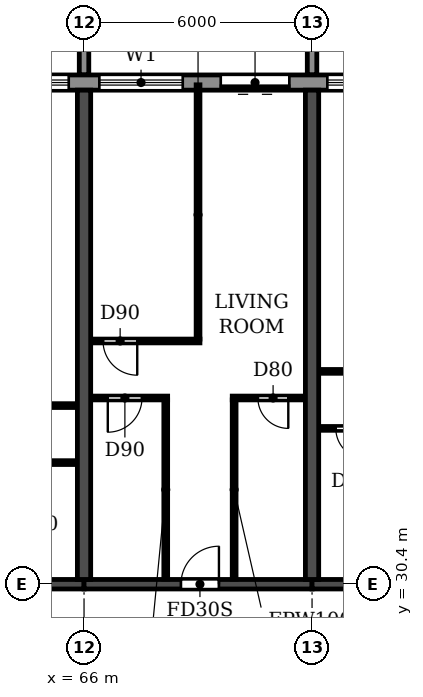
"""IFC4 building model, lengths in metres.
Left out: names, types, materials, properties, quantities, classifications, styles, units other than length and angle.
Written with IfcOpenShell. Run it as: python <this file> out.ifc"""

import sys

from ifc_helpers import new_model, si_unit, direction, frame, frame_2d, origin, place, context, subcontext, project, spatial, polyline, rectangle, outline, extrude, source, transform, mapped, element, fill, save


model = new_model("IFC4")
c1 = context("Model", 3, precision=1e-05, world=origin(), true_north=direction((0.0, 1.0)))
c2 = subcontext(c1, "Body", "Model", "MODEL_VIEW")
j1 = project(units=[si_unit("LENGTHUNIT", "METRE"), si_unit("PLANEANGLEUNIT", "RADIAN")], contexts=[c1])
p1 = place(None, origin())
s1 = spatial("IfcSite", under=j1, at=p1, CompositionType="ELEMENT")
p2 = place(p1, origin())
s2 = spatial("IfcBuilding", under=s1, at=p2, CompositionType="ELEMENT")
p3 = place(p2, frame((0.0, 0.0, 92.7)))
s3 = spatial("IfcBuildingStorey", under=s2, at=p3, CompositionType="ELEMENT", Elevation=92.7)
for number, where, z_axis, x_axis in (
    (1, (66.0, 30.525, 0.0), (0.0, 0.0, 1.0), (0.0, 1.0, 0.0)),
    (2, (72.0, 30.525, 0.0), (0.0, 0.0, 1.0), (0.0, 1.0, 0.0)),
):
    element("IfcWall", number, at=place(p3, frame(where, z_axis=z_axis, x_axis=x_axis)), inside=s3, PredefinedType="SHEAR", context=c2, shape_type="SweptSolid", body=[
        extrude(rectangle(XDim=12.875, YDim=0.35, at=frame_2d((6.438, 0.0))), origin(), (0.0, 0.0, 1.0), 3.06),
    ])
p4 = place(p3, frame((60.0, 30.4, 0.0), z_axis=(0.0, 0.0, 1.0), x_axis=(1.0, 0.0, 0.0)))
e3 = element("IfcWall", 3, at=p4, inside=s3, PredefinedType="SHEAR", context=c2, shape_type="SweptSolid", body=[
    extrude(rectangle(XDim=6.0, YDim=0.25, at=frame_2d((3.0, 0.0))), origin(), (0.0, 0.0, 1.0), 2.46),
])
p5 = place(p3, frame((66.0, 30.4, 0.0), z_axis=(0.0, 0.0, 1.0), x_axis=(1.0, 0.0, 0.0)))
e4 = element("IfcWall", 4, at=p5, inside=s3, PredefinedType="SHEAR", context=c2, shape_type="SweptSolid", body=[
    extrude(rectangle(XDim=6.0, YDim=0.25, at=frame_2d((3.0, 0.0))), origin(), (0.0, 0.0, 1.0), 2.46),
])
p6 = place(p5, frame((2.55, 0.0, 0.0)))
e5 = element("IfcOpeningElement", 5, at=p6, cuts=e4, PredefinedType="OPENING", context=c2, shape_type="SweptSolid", body=[
    extrude(rectangle(XDim=1.0, YDim=2.1, at=frame_2d((0.5, 1.05))), frame((0.0, 0.135, 0.0), z_axis=(0.0, -1.0, 0.0), x_axis=(1.0, 0.0, 0.0)), (0.0, 0.0, 1.0), 0.27),
])
p7 = place(p3, frame((72.0, 30.4, 0.0), z_axis=(0.0, 0.0, 1.0), x_axis=(1.0, 0.0, 0.0)))
e6 = element("IfcWall", 6, at=p7, inside=s3, PredefinedType="SHEAR", context=c2, shape_type="SweptSolid", body=[
    extrude(rectangle(XDim=6.0, YDim=0.25, at=frame_2d((3.0, 0.0))), origin(), (0.0, 0.0, 1.0), 2.46),
])
p8 = place(p7, frame((2.45, 0.0, 0.0)))
e7 = element("IfcOpeningElement", 7, at=p8, cuts=e6, PredefinedType="OPENING", context=c2, shape_type="SweptSolid", body=[
    extrude(rectangle(XDim=1.0, YDim=2.1, at=frame_2d((0.5, 1.05))), frame((0.0, 0.135, 0.0), z_axis=(0.0, -1.0, 0.0), x_axis=(1.0, 0.0, 0.0)), (0.0, 0.0, 1.0), 0.27),
])
p9 = place(p3, frame((91.317, 43.6, 0.0), z_axis=(0.0, 0.0, 1.0), x_axis=(-1.0, 0.0, 0.0)))
e8 = element("IfcWall", 8, at=p9, inside=s3, PredefinedType="STANDARD", context=c2, shape_type="SweptSolid", body=[
    extrude(rectangle(XDim=80.634, YDim=0.4, at=frame_2d((40.317, 0.0))), origin(), (0.0, 0.0, 1.0), 3.06),
])
p10 = place(p9, frame((76.717, 0.0, 0.9)))
e9 = element("IfcOpeningElement", 9, at=p10, cuts=e8, PredefinedType="OPENING", context=c2, shape_type="SweptSolid", body=[
    extrude(rectangle(XDim=2.2, YDim=1.5, at=frame_2d((1.1, 0.75))), frame((0.0, 0.21, 0.0), z_axis=(0.0, -1.0, 0.0), x_axis=(1.0, 0.0, 0.0)), (0.0, 0.0, 1.0), 0.42),
])
p11 = place(p9, frame((73.917, 0.0, 0.0)))
e10 = element("IfcOpeningElement", 10, at=p11, cuts=e8, PredefinedType="OPENING", context=c2, shape_type="SweptSolid", body=[
    extrude(rectangle(XDim=1.8, YDim=2.4, at=frame_2d((0.9, 1.2))), frame((0.0, 0.21, 0.0), z_axis=(0.0, -1.0, 0.0), x_axis=(1.0, 0.0, 0.0)), (0.0, 0.0, 1.0), 0.42),
])
p12 = place(p9, frame((70.717, 0.0, 0.9)))
e11 = element("IfcOpeningElement", 11, at=p12, cuts=e8, PredefinedType="OPENING", context=c2, shape_type="SweptSolid", body=[
    extrude(rectangle(XDim=2.2, YDim=1.5, at=frame_2d((1.1, 0.75))), frame((0.0, 0.21, 0.0), z_axis=(0.0, -1.0, 0.0), x_axis=(1.0, 0.0, 0.0)), (0.0, 0.0, 1.0), 0.42),
])
p13 = place(p9, frame((67.717, 0.0, 0.9)))
e12 = element("IfcOpeningElement", 12, at=p13, cuts=e8, PredefinedType="OPENING", context=c2, shape_type="SweptSolid", body=[
    extrude(rectangle(XDim=2.2, YDim=1.5, at=frame_2d((1.1, 0.75))), frame((0.0, 0.21, 0.0), z_axis=(0.0, -1.0, 0.0), x_axis=(1.0, 0.0, 0.0)), (0.0, 0.0, 1.0), 0.42),
])
p14 = place(p9, frame((64.717, 0.0, 0.9)))
e13 = element("IfcOpeningElement", 13, at=p14, cuts=e8, PredefinedType="OPENING", context=c2, shape_type="SweptSolid", body=[
    extrude(rectangle(XDim=2.2, YDim=1.5, at=frame_2d((1.1, 0.75))), frame((0.0, 0.21, 0.0), z_axis=(0.0, -1.0, 0.0), x_axis=(1.0, 0.0, 0.0)), (0.0, 0.0, 1.0), 0.42),
])
p15 = place(p9, frame((61.917, 0.0, 0.0)))
e14 = element("IfcOpeningElement", 14, at=p15, cuts=e8, PredefinedType="OPENING", context=c2, shape_type="SweptSolid", body=[
    extrude(rectangle(XDim=1.8, YDim=2.4, at=frame_2d((0.9, 1.2))), frame((0.0, 0.21, 0.0), z_axis=(0.0, -1.0, 0.0), x_axis=(1.0, 0.0, 0.0)), (0.0, 0.0, 1.0), 0.42),
])
p16 = place(p9, frame((58.717, 0.0, 0.9)))
e15 = element("IfcOpeningElement", 15, at=p16, cuts=e8, PredefinedType="OPENING", context=c2, shape_type="SweptSolid", body=[
    extrude(rectangle(XDim=2.2, YDim=1.5, at=frame_2d((1.1, 0.75))), frame((0.0, 0.21, 0.0), z_axis=(0.0, -1.0, 0.0), x_axis=(1.0, 0.0, 0.0)), (0.0, 0.0, 1.0), 0.42),
])
p17 = place(p9, frame((55.717, 0.0, 0.9)))
e16 = element("IfcOpeningElement", 16, at=p17, cuts=e8, PredefinedType="OPENING", context=c2, shape_type="SweptSolid", body=[
    extrude(rectangle(XDim=2.2, YDim=1.5, at=frame_2d((1.1, 0.75))), frame((0.0, 0.21, 0.0), z_axis=(0.0, -1.0, 0.0), x_axis=(1.0, 0.0, 0.0)), (0.0, 0.0, 1.0), 0.42),
])
p18 = place(p9, frame((52.917, 0.0, 0.0)))
e17 = element("IfcOpeningElement", 17, at=p18, cuts=e8, PredefinedType="OPENING", context=c2, shape_type="SweptSolid", body=[
    extrude(rectangle(XDim=1.8, YDim=2.4, at=frame_2d((0.9, 1.2))), frame((0.0, 0.21, 0.0), z_axis=(0.0, -1.0, 0.0), x_axis=(1.0, 0.0, 0.0)), (0.0, 0.0, 1.0), 0.42),
])
p19 = place(p9, frame((49.717, 0.0, 0.9)))
e18 = element("IfcOpeningElement", 18, at=p19, cuts=e8, PredefinedType="OPENING", context=c2, shape_type="SweptSolid", body=[
    extrude(rectangle(XDim=2.2, YDim=1.5, at=frame_2d((1.1, 0.75))), frame((0.0, 0.21, 0.0), z_axis=(0.0, -1.0, 0.0), x_axis=(1.0, 0.0, 0.0)), (0.0, 0.0, 1.0), 0.42),
])
p20 = place(p9, frame((46.717, 0.0, 0.9)))
e19 = element("IfcOpeningElement", 19, at=p20, cuts=e8, PredefinedType="OPENING", context=c2, shape_type="SweptSolid", body=[
    extrude(rectangle(XDim=2.2, YDim=1.5, at=frame_2d((1.1, 0.75))), frame((0.0, 0.21, 0.0), z_axis=(0.0, -1.0, 0.0), x_axis=(1.0, 0.0, 0.0)), (0.0, 0.0, 1.0), 0.42),
])
p21 = place(p9, frame((43.717, 0.0, 0.9)))
e20 = element("IfcOpeningElement", 20, at=p21, cuts=e8, PredefinedType="OPENING", context=c2, shape_type="SweptSolid", body=[
    extrude(rectangle(XDim=2.2, YDim=1.5, at=frame_2d((1.1, 0.75))), frame((0.0, 0.21, 0.0), z_axis=(0.0, -1.0, 0.0), x_axis=(1.0, 0.0, 0.0)), (0.0, 0.0, 1.0), 0.42),
])
p22 = place(p9, frame((40.717, 0.0, 0.9)))
e21 = element("IfcOpeningElement", 21, at=p22, cuts=e8, PredefinedType="OPENING", context=c2, shape_type="SweptSolid", body=[
    extrude(rectangle(XDim=2.2, YDim=1.5, at=frame_2d((1.1, 0.75))), frame((0.0, 0.21, 0.0), z_axis=(0.0, -1.0, 0.0), x_axis=(1.0, 0.0, 0.0)), (0.0, 0.0, 1.0), 0.42),
])
p23 = place(p9, frame((37.917, 0.0, 0.0)))
e22 = element("IfcOpeningElement", 22, at=p23, cuts=e8, PredefinedType="OPENING", context=c2, shape_type="SweptSolid", body=[
    extrude(rectangle(XDim=1.8, YDim=2.4, at=frame_2d((0.9, 1.2))), frame((0.0, 0.21, 0.0), z_axis=(0.0, -1.0, 0.0), x_axis=(1.0, 0.0, 0.0)), (0.0, 0.0, 1.0), 0.42),
])
p24 = place(p9, frame((34.917, 0.0, 0.0)))
e23 = element("IfcOpeningElement", 23, at=p24, cuts=e8, PredefinedType="OPENING", context=c2, shape_type="SweptSolid", body=[
    extrude(rectangle(XDim=1.8, YDim=2.4, at=frame_2d((0.9, 1.2))), frame((0.0, 0.21, 0.0), z_axis=(0.0, -1.0, 0.0), x_axis=(1.0, 0.0, 0.0)), (0.0, 0.0, 1.0), 0.42),
])
p25 = place(p9, frame((31.717, 0.0, 0.9)))
e24 = element("IfcOpeningElement", 24, at=p25, cuts=e8, PredefinedType="OPENING", context=c2, shape_type="SweptSolid", body=[
    extrude(rectangle(XDim=2.2, YDim=1.5, at=frame_2d((1.1, 0.75))), frame((0.0, 0.21, 0.0), z_axis=(0.0, -1.0, 0.0), x_axis=(1.0, 0.0, 0.0)), (0.0, 0.0, 1.0), 0.42),
])
p26 = place(p9, frame((28.717, 0.0, 0.9)))
e25 = element("IfcOpeningElement", 25, at=p26, cuts=e8, PredefinedType="OPENING", context=c2, shape_type="SweptSolid", body=[
    extrude(rectangle(XDim=2.2, YDim=1.5, at=frame_2d((1.1, 0.75))), frame((0.0, 0.21, 0.0), z_axis=(0.0, -1.0, 0.0), x_axis=(1.0, 0.0, 0.0)), (0.0, 0.0, 1.0), 0.42),
])
p27 = place(p9, frame((25.717, 0.0, 0.9)))
e26 = element("IfcOpeningElement", 26, at=p27, cuts=e8, PredefinedType="OPENING", context=c2, shape_type="SweptSolid", body=[
    extrude(rectangle(XDim=2.2, YDim=1.5, at=frame_2d((1.1, 0.75))), frame((0.0, 0.21, 0.0), z_axis=(0.0, -1.0, 0.0), x_axis=(1.0, 0.0, 0.0)), (0.0, 0.0, 1.0), 0.42),
])
p28 = place(p9, frame((22.717, 0.0, 0.9)))
e27 = element("IfcOpeningElement", 27, at=p28, cuts=e8, PredefinedType="OPENING", context=c2, shape_type="SweptSolid", body=[
    extrude(rectangle(XDim=2.2, YDim=1.5, at=frame_2d((1.1, 0.75))), frame((0.0, 0.21, 0.0), z_axis=(0.0, -1.0, 0.0), x_axis=(1.0, 0.0, 0.0)), (0.0, 0.0, 1.0), 0.42),
])
p29 = place(p9, frame((19.917, 0.0, 0.0)))
e28 = element("IfcOpeningElement", 28, at=p29, cuts=e8, PredefinedType="OPENING", context=c2, shape_type="SweptSolid", body=[
    extrude(rectangle(XDim=1.8, YDim=2.4, at=frame_2d((0.9, 1.2))), frame((0.0, 0.21, 0.0), z_axis=(0.0, -1.0, 0.0), x_axis=(1.0, 0.0, 0.0)), (0.0, 0.0, 1.0), 0.42),
])
p30 = place(p9, frame((16.717, 0.0, 0.9)))
e29 = element("IfcOpeningElement", 29, at=p30, cuts=e8, PredefinedType="OPENING", context=c2, shape_type="SweptSolid", body=[
    extrude(rectangle(XDim=2.2, YDim=1.5, at=frame_2d((1.1, 0.75))), frame((0.0, 0.21, 0.0), z_axis=(0.0, -1.0, 0.0), x_axis=(1.0, 0.0, 0.0)), (0.0, 0.0, 1.0), 0.42),
])
p31 = place(p9, frame((13.917, 0.0, 0.0)))
e30 = element("IfcOpeningElement", 30, at=p31, cuts=e8, PredefinedType="OPENING", context=c2, shape_type="SweptSolid", body=[
    extrude(rectangle(XDim=1.8, YDim=2.4, at=frame_2d((0.9, 1.2))), frame((0.0, 0.21, 0.0), z_axis=(0.0, -1.0, 0.0), x_axis=(1.0, 0.0, 0.0)), (0.0, 0.0, 1.0), 0.42),
])
p32 = place(p9, frame((10.717, 0.0, 0.9)))
e31 = element("IfcOpeningElement", 31, at=p32, cuts=e8, PredefinedType="OPENING", context=c2, shape_type="SweptSolid", body=[
    extrude(rectangle(XDim=2.2, YDim=1.5, at=frame_2d((1.1, 0.75))), frame((0.0, 0.21, 0.0), z_axis=(0.0, -1.0, 0.0), x_axis=(1.0, 0.0, 0.0)), (0.0, 0.0, 1.0), 0.42),
])
p33 = place(p9, frame((7.917, 0.0, 0.0)))
e32 = element("IfcOpeningElement", 32, at=p33, cuts=e8, PredefinedType="OPENING", context=c2, shape_type="SweptSolid", body=[
    extrude(rectangle(XDim=1.8, YDim=2.4, at=frame_2d((0.9, 1.2))), frame((0.0, 0.21, 0.0), z_axis=(0.0, -1.0, 0.0), x_axis=(1.0, 0.0, 0.0)), (0.0, 0.0, 1.0), 0.42),
])
p34 = place(p9, frame((4.717, 0.0, 0.9)))
e33 = element("IfcOpeningElement", 33, at=p34, cuts=e8, PredefinedType="OPENING", context=c2, shape_type="SweptSolid", body=[
    extrude(rectangle(XDim=2.2, YDim=1.5, at=frame_2d((1.1, 0.75))), frame((0.0, 0.21, 0.0), z_axis=(0.0, -1.0, 0.0), x_axis=(1.0, 0.0, 0.0)), (0.0, 0.0, 1.0), 0.42),
])
p35 = place(p9, frame((1.917, 0.0, 0.0)))
e34 = element("IfcOpeningElement", 34, at=p35, cuts=e8, PredefinedType="OPENING", context=c2, shape_type="SweptSolid", body=[
    extrude(rectangle(XDim=1.8, YDim=2.4, at=frame_2d((0.9, 1.2))), frame((0.0, 0.21, 0.0), z_axis=(0.0, -1.0, 0.0), x_axis=(1.0, 0.0, 0.0)), (0.0, 0.0, 1.0), 0.42),
])
m1 = source(origin(), c2, "Body", "SweptSolid", [
    extrude(outline(polyline([(0.0, 0.0), (0.25, 0.0), (0.25, 3.1), (0.0, 3.1), (0.0, 0.0)])), origin(), (0.0, 0.0, 1.0), 3.1),
])
for number, where in (
    (35, (65.875, 43.8, 0.0)),
    (36, (71.875, 43.8, 0.0)),
):
    element("IfcWall", number, at=place(p3, frame(where)), inside=s3, PredefinedType="STANDARD", context=c2, shape_type="MappedRepresentation", body=[
        mapped(m1, transform((0.0, 0.0, 0.0))),
    ])
p36 = place(p3, frame((62.65, 33.6, 0.0), z_axis=(0.0, 0.0, 1.0), x_axis=(1.0, 0.0, 0.0)))
e37 = element("IfcWall", 37, at=p36, inside=s3, PredefinedType="PARTITIONING", context=c2, shape_type="SweptSolid", body=[
    extrude(rectangle(XDim=3.165, YDim=0.1, at=frame_2d((1.583, 0.0))), origin(), (0.0, 0.0, 1.0), 3.06),
])
p37 = place(p36, frame((1.3, 0.0, 0.0)))
e38 = element("IfcOpeningElement", 38, at=p37, cuts=e37, PredefinedType="OPENING", context=c2, shape_type="SweptSolid", body=[
    extrude(rectangle(XDim=0.8, YDim=2.1, at=frame_2d((0.4, 1.05))), frame((0.0, 0.06, 0.0), z_axis=(0.0, -1.0, 0.0), x_axis=(1.0, 0.0, 0.0)), (0.0, 0.0, 1.0), 0.12),
])
p38 = place(p3, frame((72.185, 34.5, 0.0), z_axis=(0.0, 0.0, 1.0), x_axis=(1.0, 0.0, 0.0)))
e39 = element("IfcWall", 39, at=p38, inside=s3, PredefinedType="PARTITIONING", context=c2, shape_type="SweptSolid", body=[
    extrude(rectangle(XDim=1.915, YDim=0.1, at=frame_2d((0.958, 0.0))), origin(), (0.0, 0.0, 1.0), 3.06),
])
p39 = place(p38, frame((0.44, 0.0, 0.0)))
e40 = element("IfcOpeningElement", 40, at=p39, cuts=e39, PredefinedType="OPENING", context=c2, shape_type="SweptSolid", body=[
    extrude(rectangle(XDim=0.8, YDim=2.1, at=frame_2d((0.4, 1.05))), frame((0.0, 0.06, 0.0), z_axis=(0.0, -1.0, 0.0), x_axis=(1.0, 0.0, 0.0)), (0.0, 0.0, 1.0), 0.12),
])
p40 = place(p3, frame((60.185, 35.1, 0.0), z_axis=(0.0, 0.0, 1.0), x_axis=(1.0, 0.0, 0.0)))
e41 = element("IfcWall", 41, at=p40, inside=s3, PredefinedType="PARTITIONING", context=c2, shape_type="SweptSolid", body=[
    extrude(rectangle(XDim=5.63, YDim=0.1, at=frame_2d((2.815, 0.0))), origin(), (0.0, 0.0, 1.0), 3.06),
])
p41 = place(p40, frame((1.415, 0.0, 0.0)))
e42 = element("IfcOpeningElement", 42, at=p41, cuts=e41, PredefinedType="OPENING", context=c2, shape_type="SweptSolid", body=[
    extrude(rectangle(XDim=0.9, YDim=2.1, at=frame_2d((0.45, 1.05))), frame((0.0, 0.06, 0.0), z_axis=(0.0, -1.0, 0.0), x_axis=(1.0, 0.0, 0.0)), (0.0, 0.0, 1.0), 0.12),
])
p42 = place(p40, frame((3.315, 0.0, 0.0)))
e43 = element("IfcOpeningElement", 43, at=p42, cuts=e41, PredefinedType="OPENING", context=c2, shape_type="SweptSolid", body=[
    extrude(rectangle(XDim=0.9, YDim=2.1, at=frame_2d((0.45, 1.05))), frame((0.0, 0.06, 0.0), z_axis=(0.0, -1.0, 0.0), x_axis=(1.0, 0.0, 0.0)), (0.0, 0.0, 1.0), 0.12),
])
p43 = place(p3, frame((66.185, 35.3, 0.0), z_axis=(0.0, 0.0, 1.0), x_axis=(1.0, 0.0, 0.0)))
e44 = element("IfcWall", 44, at=p43, inside=s3, PredefinedType="PARTITIONING", context=c2, shape_type="SweptSolid", body=[
    extrude(rectangle(XDim=2.015, YDim=0.1, at=frame_2d((1.007, 0.0))), origin(), (0.0, 0.0, 1.0), 3.06),
])
p44 = place(p43, frame((0.44, 0.0, 0.0)))
e45 = element("IfcOpeningElement", 45, at=p44, cuts=e44, PredefinedType="OPENING", context=c2, shape_type="SweptSolid", body=[
    extrude(rectangle(XDim=0.9, YDim=2.1, at=frame_2d((0.45, 1.05))), frame((0.0, 0.06, 0.0), z_axis=(0.0, -1.0, 0.0), x_axis=(1.0, 0.0, 0.0)), (0.0, 0.0, 1.0), 0.12),
])
p45 = place(p3, frame((69.9, 35.3, 0.0), z_axis=(0.0, 0.0, 1.0), x_axis=(1.0, 0.0, 0.0)))
e46 = element("IfcWall", 46, at=p45, inside=s3, PredefinedType="PARTITIONING", context=c2, shape_type="SweptSolid", body=[
    extrude(rectangle(XDim=1.915, YDim=0.1, at=frame_2d((0.958, 0.0))), origin(), (0.0, 0.0, 1.0), 3.06),
])
p46 = place(p45, frame((0.675, 0.0, 0.0)))
e47 = element("IfcOpeningElement", 47, at=p46, cuts=e46, PredefinedType="OPENING", context=c2, shape_type="SweptSolid", body=[
    extrude(rectangle(XDim=0.8, YDim=2.1, at=frame_2d((0.4, 1.05))), frame((0.0, 0.06, 0.0), z_axis=(0.0, -1.0, 0.0), x_axis=(1.0, 0.0, 0.0)), (0.0, 0.0, 1.0), 0.12),
])
p47 = place(p3, frame((72.185, 36.0, 0.0), z_axis=(0.0, 0.0, 1.0), x_axis=(1.0, 0.0, 0.0)))
e48 = element("IfcWall", 48, at=p47, inside=s3, PredefinedType="PARTITIONING", context=c2, shape_type="SweptSolid", body=[
    extrude(rectangle(XDim=2.865, YDim=0.1, at=frame_2d((1.433, 0.0))), origin(), (0.0, 0.0, 1.0), 3.06),
])
p48 = place(p47, frame((1.415, 0.0, 0.0)))
e49 = element("IfcOpeningElement", 49, at=p48, cuts=e48, PredefinedType="OPENING", context=c2, shape_type="SweptSolid", body=[
    extrude(rectangle(XDim=0.9, YDim=2.1, at=frame_2d((0.45, 1.05))), frame((0.0, 0.06, 0.0), z_axis=(0.0, -1.0, 0.0), x_axis=(1.0, 0.0, 0.0)), (0.0, 0.0, 1.0), 0.12),
])
p49 = place(p3, frame((66.185, 36.8, 0.0), z_axis=(0.0, 0.0, 1.0), x_axis=(1.0, 0.0, 0.0)))
e50 = element("IfcWall", 50, at=p49, inside=s3, PredefinedType="PARTITIONING", context=c2, shape_type="SweptSolid", body=[
    extrude(rectangle(XDim=2.865, YDim=0.1, at=frame_2d((1.433, 0.0))), origin(), (0.0, 0.0, 1.0), 3.06),
])
p50 = place(p49, frame((0.315, 0.0, 0.0)))
e51 = element("IfcOpeningElement", 51, at=p50, cuts=e50, PredefinedType="OPENING", context=c2, shape_type="SweptSolid", body=[
    extrude(rectangle(XDim=0.9, YDim=2.1, at=frame_2d((0.45, 1.05))), frame((0.0, 0.06, 0.0), z_axis=(0.0, -1.0, 0.0), x_axis=(1.0, 0.0, 0.0)), (0.0, 0.0, 1.0), 0.12),
])
p51 = place(p3, frame((68.15, 30.535, 0.0), z_axis=(0.0, 0.0, 1.0), x_axis=(0.0, 1.0, 0.0)))
e52 = element("IfcWall", 52, at=p51, inside=s3, PredefinedType="PARTITIONING", context=c2, shape_type="SweptSolid", body=[
    extrude(rectangle(XDim=4.715, YDim=0.1, at=frame_2d((2.357, 0.0))), origin(), (0.0, 0.0, 1.0), 3.06),
])
p52 = place(p3, frame((69.0, 36.85, 0.0), z_axis=(0.0, 0.0, 1.0), x_axis=(0.0, 1.0, 0.0)))
e53 = element("IfcWall", 53, at=p52, inside=s3, PredefinedType="PARTITIONING", context=c2, shape_type="SweptSolid", body=[
    extrude(rectangle(XDim=6.69, YDim=0.1, at=frame_2d((3.345, 0.0))), origin(), (0.0, 0.0, 1.0), 3.06),
])
p53 = place(p3, frame((69.95, 30.535, 0.0), z_axis=(0.0, 0.0, 1.0), x_axis=(0.0, 1.0, 0.0)))
e54 = element("IfcWall", 54, at=p53, inside=s3, PredefinedType="PARTITIONING", context=c2, shape_type="SweptSolid", body=[
    extrude(rectangle(XDim=4.715, YDim=0.1, at=frame_2d((2.357, 0.0))), origin(), (0.0, 0.0, 1.0), 3.06),
])
p54 = place(p27, origin())
e55 = element("IfcWindow", 55, at=p54, inside=s3, PartitioningType="DOUBLE_PANEL_HORIZONTAL", PredefinedType="WINDOW", context=c2, shape_type="SweptSolid", body=[
    extrude(rectangle(XDim=2.2, YDim=1.5, at=frame_2d((1.1, 0.75))), frame((0.0, 0.03, 0.0), z_axis=(0.0, -1.0, 0.0), x_axis=(1.0, 0.0, 0.0)), (0.0, 0.0, 1.0), 0.06),
])
fill(e26, e55)
p55 = place(p28, origin())
e56 = element("IfcWindow", 56, at=p55, inside=s3, PartitioningType="DOUBLE_PANEL_HORIZONTAL", PredefinedType="WINDOW", context=c2, shape_type="SweptSolid", body=[
    extrude(rectangle(XDim=2.2, YDim=1.5, at=frame_2d((1.1, 0.75))), frame((0.0, 0.03, 0.0), z_axis=(0.0, -1.0, 0.0), x_axis=(1.0, 0.0, 0.0)), (0.0, 0.0, 1.0), 0.06),
])
fill(e27, e56)
p56 = place(p29, origin())
e57 = element("IfcDoor", 57, at=p56, inside=s3, OperationType="DOUBLE_DOOR_SLIDING", PredefinedType="DOOR", context=c2, shape_type="SweptSolid", body=[
    extrude(rectangle(XDim=1.8, YDim=2.4, at=frame_2d((0.9, 1.2))), frame((0.0, 0.025, 0.0), z_axis=(0.0, -1.0, 0.0), x_axis=(1.0, 0.0, 0.0)), (0.0, 0.0, 1.0), 0.05),
])
fill(e28, e57)
p57 = place(p30, origin())
e58 = element("IfcWindow", 58, at=p57, inside=s3, PartitioningType="DOUBLE_PANEL_HORIZONTAL", PredefinedType="WINDOW", context=c2, shape_type="SweptSolid", body=[
    extrude(rectangle(XDim=2.2, YDim=1.5, at=frame_2d((1.1, 0.75))), frame((0.0, 0.03, 0.0), z_axis=(0.0, -1.0, 0.0), x_axis=(1.0, 0.0, 0.0)), (0.0, 0.0, 1.0), 0.06),
])
fill(e29, e58)
p58 = place(p50, frame((0.9, 0.0, 0.0), z_axis=(0.0, 0.0, 1.0), x_axis=(-1.0, 0.0, 0.0)))
e59 = element("IfcDoor", 59, at=p58, inside=s3, OperationType="SINGLE_SWING_LEFT", PredefinedType="DOOR", context=c2, shape_type="SweptSolid", body=[
    extrude(rectangle(XDim=0.9, YDim=2.1, at=frame_2d((0.45, 1.05))), frame((0.0, 0.025, 0.0), z_axis=(0.0, -1.0, 0.0), x_axis=(1.0, 0.0, 0.0)), (0.0, 0.0, 1.0), 0.05),
])
fill(e51, e59)
p59 = place(p44, frame((0.9, 0.0, 0.0), z_axis=(0.0, 0.0, 1.0), x_axis=(-1.0, 0.0, 0.0)))
e60 = element("IfcDoor", 60, at=p59, inside=s3, OperationType="SINGLE_SWING_RIGHT", PredefinedType="DOOR", context=c2, shape_type="SweptSolid", body=[
    extrude(rectangle(XDim=0.9, YDim=2.1, at=frame_2d((0.45, 1.05))), frame((0.0, 0.025, 0.0), z_axis=(0.0, -1.0, 0.0), x_axis=(1.0, 0.0, 0.0)), (0.0, 0.0, 1.0), 0.05),
])
fill(e45, e60)
p60 = place(p6, origin())
e61 = element("IfcDoor", 61, at=p60, inside=s3, OperationType="SINGLE_SWING_RIGHT", PredefinedType="DOOR", context=c2, shape_type="SweptSolid", body=[
    extrude(rectangle(XDim=1.0, YDim=2.1, at=frame_2d((0.5, 1.05))), frame((0.0, 0.025, 0.0), z_axis=(0.0, -1.0, 0.0), x_axis=(1.0, 0.0, 0.0)), (0.0, 0.0, 1.0), 0.05),
])
fill(e5, e61)
p61 = place(p46, frame((0.8, 0.0, 0.0), z_axis=(0.0, 0.0, 1.0), x_axis=(-1.0, 0.0, 0.0)))
e62 = element("IfcDoor", 62, at=p61, inside=s3, OperationType="SINGLE_SWING_LEFT", PredefinedType="DOOR", context=c2, shape_type="SweptSolid", body=[
    extrude(rectangle(XDim=0.8, YDim=2.1, at=frame_2d((0.4, 1.05))), frame((0.0, 0.025, 0.0), z_axis=(0.0, -1.0, 0.0), x_axis=(1.0, 0.0, 0.0)), (0.0, 0.0, 1.0), 0.05),
])
fill(e47, e62)
p62 = place(p39, frame((0.8, 0.0, 0.0), z_axis=(0.0, 0.0, 1.0), x_axis=(-1.0, 0.0, 0.0)))
e63 = element("IfcDoor", 63, at=p62, inside=s3, OperationType="SINGLE_SWING_LEFT", PredefinedType="DOOR", context=c2, shape_type="SweptSolid", body=[
    extrude(rectangle(XDim=0.8, YDim=2.1, at=frame_2d((0.4, 1.05))), frame((0.0, 0.025, 0.0), z_axis=(0.0, -1.0, 0.0), x_axis=(1.0, 0.0, 0.0)), (0.0, 0.0, 1.0), 0.05),
])
fill(e40, e63)
save(model, sys.argv[1])
